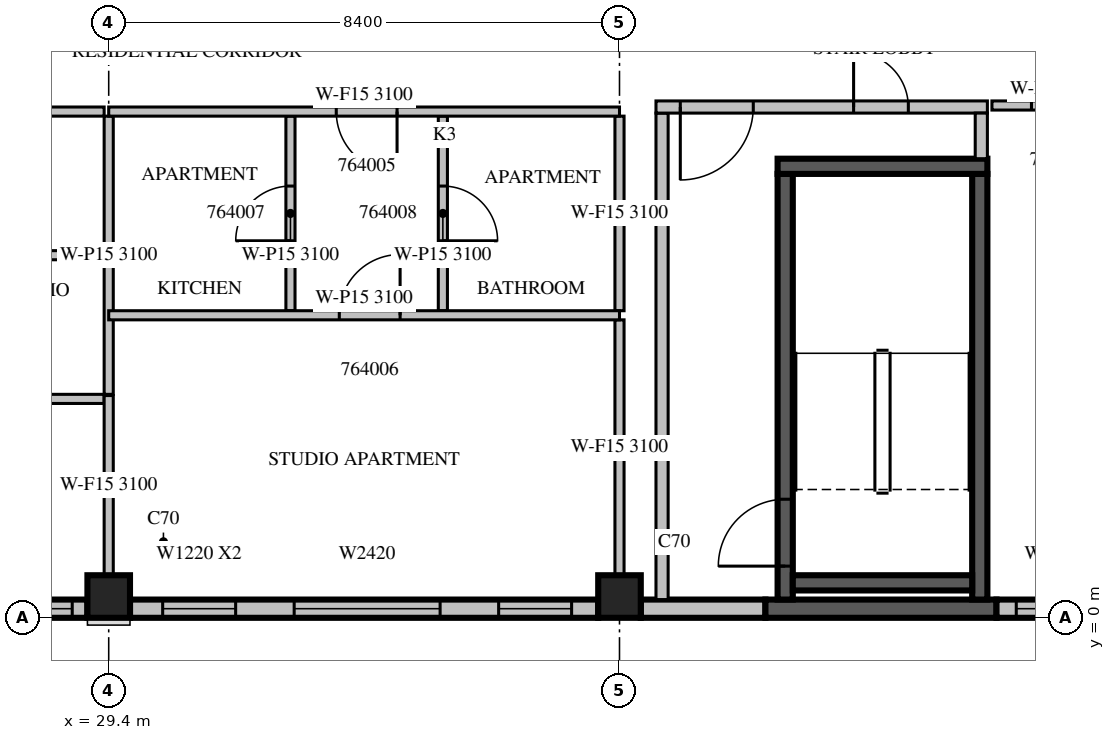
"""IFC4 building model, lengths in metres.
Left out: names, types, materials, properties, quantities, classifications, styles, units other than length and angle.
Written with IfcOpenShell. Run it as: python <this file> out.ifc"""

import sys

from ifc_helpers import new_model, si_unit, direction, frame, frame_2d, origin, origin_2d, place, context, subcontext, project, spatial, rectangle, extrude, source, transform, mapped, element, fill, save


model = new_model("IFC4")
c1 = context("Model", 3, precision=1e-05, world=origin(), true_north=direction((0.0, 1.0)))
c2 = subcontext(c1, "Body", "Model", "MODEL_VIEW")
j1 = project(units=[si_unit("LENGTHUNIT", "METRE"), si_unit("PLANEANGLEUNIT", "RADIAN")], contexts=[c1])
p1 = place(None, origin())
s1 = spatial("IfcSite", under=j1, at=p1, CompositionType="ELEMENT")
p2 = place(p1, origin())
s2 = spatial("IfcBuilding", under=s1, at=p2, CompositionType="ELEMENT")
p3 = place(p2, frame((0.0, 0.0, 284.5)))
s3 = spatial("IfcBuildingStorey", under=s2, at=p3, CompositionType="ELEMENT", Elevation=284.5)
m1 = source(origin(), c2, "Body", "SweptSolid", [
    extrude(rectangle(XDim=0.7, YDim=0.7, at=origin_2d()), origin(), (0.0, 0.0, 1.0), 3.5),
])
for number, where, z_axis, x_axis in (
    (1, (29.4, 0.35, 0.0), (0.0, 0.0, 1.0), (1.0, 0.0, 0.0)),
    (2, (37.8, 0.35, 0.0), (0.0, 0.0, 1.0), (1.0, 0.0, 0.0)),
):
    element("IfcColumn", number, at=place(p3, frame(where, z_axis=z_axis, x_axis=x_axis)), inside=s3, PredefinedType="COLUMN", context=c2, shape_type="MappedRepresentation", body=[
        mapped(m1, transform((0.0, 0.0, 0.0), scale=1.0)),
    ])
p4 = place(p3, frame((21.35, 0.15, 0.0), z_axis=(0.0, 0.0, 1.0), x_axis=(1.0, 0.0, 0.0)))
e3 = element("IfcWall", 3, at=p4, inside=s3, PredefinedType="STANDARD", context=c2, shape_type="SweptSolid", body=[
    extrude(rectangle(XDim=7.7, YDim=0.3, at=frame_2d((3.85, 0.0))), origin(), (0.0, 0.0, 1.0), 3.1),
])
p5 = place(p4, frame((0.25, 0.0, 0.6)))
e4 = element("IfcOpeningElement", 4, at=p5, cuts=e3, PredefinedType="OPENING", context=c2, shape_type="SweptSolid", body=[
    extrude(rectangle(XDim=3.0, YDim=2.0, at=frame_2d((1.5, 1.0))), frame((0.0, 0.16, 0.0), z_axis=(0.0, -1.0, 0.0), x_axis=(1.0, 0.0, 0.0)), (0.0, 0.0, 1.0), 0.32),
])
m2 = source(origin(), c2, "Body", "SweptSolid", [
    extrude(rectangle(XDim=3.0, YDim=2.0, at=frame_2d((1.5, 1.0))), frame((0.0, 0.16, 0.0), z_axis=(0.0, -1.0, 0.0), x_axis=(1.0, 0.0, 0.0)), (0.0, 0.0, 1.0), 0.32),
])
p6 = place(p4, frame((4.45, 0.0, 0.6)))
e5 = element("IfcOpeningElement", 5, at=p6, cuts=e3, PredefinedType="OPENING", context=c2, shape_type="MappedRepresentation", body=[
    mapped(m2, transform((0.0, 0.0, 0.0), scale=1.0)),
])
m3 = source(origin(), c2, "Body", "SweptSolid", [
    extrude(rectangle(XDim=7.7, YDim=0.3, at=frame_2d((3.85, 0.0))), origin(), (0.0, 0.0, 1.0), 3.1),
])
p7 = place(p3, frame((29.75, 0.15, 0.0), z_axis=(0.0, 0.0, 1.0), x_axis=(1.0, 0.0, 0.0)))
e6 = element("IfcWall", 6, at=p7, inside=s3, PredefinedType="STANDARD", context=c2, shape_type="MappedRepresentation", body=[
    mapped(m3, transform((0.0, 0.0, 0.0), scale=1.0)),
])
p8 = place(p7, frame((0.537, 0.0, 0.6)))
e7 = element("IfcOpeningElement", 7, at=p8, cuts=e6, PredefinedType="OPENING", context=c2, shape_type="SweptSolid", body=[
    extrude(rectangle(XDim=1.2, YDim=2.0, at=frame_2d((0.6, 1.0))), frame((0.0, 0.16, 0.0), z_axis=(0.0, -1.0, 0.0), x_axis=(1.0, 0.0, 0.0)), (0.0, 0.0, 1.0), 0.32),
])
m4 = source(origin(), c2, "Body", "SweptSolid", [
    extrude(rectangle(XDim=1.2, YDim=2.0, at=frame_2d((0.6, 1.0))), frame((0.0, 0.16, 0.0), z_axis=(0.0, -1.0, 0.0), x_axis=(1.0, 0.0, 0.0)), (0.0, 0.0, 1.0), 0.32),
])
p9 = place(p7, frame((6.062, 0.0, 0.6)))
e8 = element("IfcOpeningElement", 8, at=p9, cuts=e6, PredefinedType="OPENING", context=c2, shape_type="MappedRepresentation", body=[
    mapped(m4, transform((0.0, 0.0, 0.0), scale=1.0)),
])
p10 = place(p7, frame((2.7, 0.0, 0.6)))
e9 = element("IfcOpeningElement", 9, at=p10, cuts=e6, PredefinedType="OPENING", context=c2, shape_type="SweptSolid", body=[
    extrude(rectangle(XDim=2.4, YDim=2.0, at=frame_2d((1.2, 1.0))), frame((0.0, 0.16, 0.0), z_axis=(0.0, -1.0, 0.0), x_axis=(1.0, 0.0, 0.0)), (0.0, 0.0, 1.0), 0.32),
])
p11 = place(p3, frame((38.15, 0.15, 0.0), z_axis=(0.0, 0.0, 1.0), x_axis=(1.0, 0.0, 0.0)))
e10 = element("IfcWall", 10, at=p11, inside=s3, PredefinedType="STANDARD", context=c2, shape_type="SweptSolid", body=[
    extrude(rectangle(XDim=2.05, YDim=0.3, at=frame_2d((1.025, 0.0))), origin(), (0.0, 0.0, 1.0), 3.1),
])
p12 = place(p3, frame((40.2, 0.15, 0.0), z_axis=(0.0, 0.0, 1.0), x_axis=(1.0, 0.0, 0.0)))
e11 = element("IfcWall", 11, at=p12, inside=s3, PredefinedType="SOLIDWALL", context=c2, shape_type="SweptSolid", body=[
    extrude(rectangle(XDim=3.8, YDim=0.3, at=frame_2d((1.9, 0.0))), origin(), (0.0, 0.0, 1.0), 3.1),
])
p13 = place(p3, frame((44.0, 0.15, 0.0), z_axis=(0.0, 0.0, 1.0), x_axis=(1.0, 0.0, 0.0)))
e12 = element("IfcWall", 12, at=p13, inside=s3, PredefinedType="STANDARD", context=c2, shape_type="SweptSolid", body=[
    extrude(rectangle(XDim=1.85, YDim=0.3, at=frame_2d((0.925, 0.0))), origin(), (0.0, 0.0, 1.0), 3.1),
])
p14 = place(p13, frame((0.325, 0.0, 0.6)))
e13 = element("IfcOpeningElement", 13, at=p14, cuts=e12, PredefinedType="OPENING", context=c2, shape_type="MappedRepresentation", body=[
    mapped(m4, transform((0.0, 0.0, 0.0), scale=1.0)),
])
p15 = place(p3, frame((40.525, 0.3, 0.0), z_axis=(0.0, 0.0, 1.0), x_axis=(0.0, 1.0, 0.0)))
e14 = element("IfcWall", 14, at=p15, inside=s3, PredefinedType="SOLIDWALL", context=c2, shape_type="SweptSolid", body=[
    extrude(rectangle(XDim=7.0, YDim=0.25, at=frame_2d((3.5, 0.0))), origin(), (0.0, 0.0, 1.0), 3.1),
])
m5 = source(origin(), c2, "Body", "SweptSolid", [
    extrude(rectangle(XDim=1.1, YDim=2.1, at=frame_2d((0.55, 1.05))), frame((0.0, 0.135, 0.0), z_axis=(0.0, -1.0, 0.0), x_axis=(1.0, 0.0, 0.0)), (0.0, 0.0, 1.0), 0.27),
])
p16 = place(p15, frame((0.55, 0.0, 0.0)))
e15 = element("IfcOpeningElement", 15, at=p16, cuts=e14, PredefinedType="OPENING", context=c2, shape_type="MappedRepresentation", body=[
    mapped(m5, transform((0.0, 0.0, 0.0), scale=1.0)),
])
m6 = source(origin(), c2, "Body", "SweptSolid", [
    extrude(rectangle(XDim=7.0, YDim=0.25, at=frame_2d((3.5, 0.0))), origin(), (0.0, 0.0, 1.0), 3.1),
])
p17 = place(p3, frame((43.725, 0.3, 0.0), z_axis=(0.0, 0.0, 1.0), x_axis=(0.0, 1.0, 0.0)))
e16 = element("IfcWall", 16, at=p17, inside=s3, PredefinedType="SOLIDWALL", context=c2, shape_type="MappedRepresentation", body=[
    mapped(m6, transform((0.0, 0.0, 0.0), scale=1.0)),
])
p18 = place(p3, frame((40.4, 7.425, 0.0), z_axis=(0.0, 0.0, 1.0), x_axis=(1.0, 0.0, 0.0)))
e17 = element("IfcWall", 17, at=p18, inside=s3, PredefinedType="SOLIDWALL", context=c2, shape_type="SweptSolid", body=[
    extrude(rectangle(XDim=3.45, YDim=0.25, at=frame_2d((1.725, 0.0))), origin(), (0.0, 0.0, 1.0), 3.1),
])
p19 = place(p3, frame((40.65, 0.575, 0.0), z_axis=(0.0, 0.0, 1.0), x_axis=(1.0, 0.0, 0.0)))
e18 = element("IfcWall", 18, at=p19, inside=s3, PredefinedType="SOLIDWALL", context=c2, shape_type="SweptSolid", body=[
    extrude(rectangle(XDim=2.95, YDim=0.25, at=frame_2d((1.475, 0.0))), origin(), (0.0, 0.0, 1.0), 3.1),
])
p20 = place(p3, frame((38.5, 0.3, 0.0), z_axis=(0.0, 0.0, 1.0), x_axis=(0.0, 1.0, 0.0)))
e19 = element("IfcWall", 19, at=p20, inside=s3, PredefinedType="PARTITIONING", context=c2, shape_type="SweptSolid", body=[
    extrude(rectangle(XDim=8.0, YDim=0.2, at=frame_2d((4.0, 0.0))), origin(), (0.0, 0.0, 1.0), 3.1),
])
p21 = place(p3, frame((38.4, 8.4, 0.0), z_axis=(0.0, 0.0, 1.0), x_axis=(1.0, 0.0, 0.0)))
e20 = element("IfcWall", 20, at=p21, inside=s3, PredefinedType="PARTITIONING", context=c2, shape_type="SweptSolid", body=[
    extrude(rectangle(XDim=5.45, YDim=0.2, at=frame_2d((2.725, 0.0))), origin(), (0.0, 0.0, 1.0), 3.1),
])
m7 = source(origin(), c2, "Body", "SweptSolid", [
    extrude(rectangle(XDim=1.2, YDim=2.1, at=frame_2d((0.6, 1.05))), frame((0.0, 0.11, 0.0), z_axis=(0.0, -1.0, 0.0), x_axis=(1.0, 0.0, 0.0)), (0.0, 0.0, 1.0), 0.22),
])
p22 = place(p21, frame((0.4, 0.0, 0.0)))
e21 = element("IfcOpeningElement", 21, at=p22, cuts=e20, PredefinedType="OPENING", context=c2, shape_type="MappedRepresentation", body=[
    mapped(m7, transform((0.0, 0.0, 0.0), scale=1.0)),
])
m8 = source(origin(), c2, "Body", "SweptSolid", [
    extrude(rectangle(XDim=0.9, YDim=2.1, at=frame_2d((0.45, 1.05))), frame((0.0, 0.11, 0.0), z_axis=(0.0, -1.0, 0.0), x_axis=(1.0, 0.0, 0.0)), (0.0, 0.0, 1.0), 0.22),
])
p23 = place(p21, frame((3.25, 0.0, 0.0)))
e22 = element("IfcOpeningElement", 22, at=p23, cuts=e20, PredefinedType="OPENING", context=c2, shape_type="MappedRepresentation", body=[
    mapped(m8, transform((0.0, 0.0, 0.0), scale=1.0)),
])
p24 = place(p3, frame((43.75, 7.55, 0.0), z_axis=(0.0, 0.0, 1.0), x_axis=(0.0, 1.0, 0.0)))
e23 = element("IfcWall", 23, at=p24, inside=s3, PredefinedType="PARTITIONING", context=c2, shape_type="SweptSolid", body=[
    extrude(rectangle(XDim=0.75, YDim=0.2, at=frame_2d((0.375, 0.0))), origin(), (0.0, 0.0, 1.0), 3.1),
])
m9 = source(origin(), c2, "Body", "SweptSolid", [
    extrude(rectangle(XDim=4.575, YDim=0.15, at=frame_2d((2.288, 0.0))), origin(), (0.0, 0.0, 1.0), 3.1),
])
p25 = place(p3, frame((29.4, 3.675, 0.0), z_axis=(0.0, 0.0, 1.0), x_axis=(0.0, 1.0, 0.0)))
e24 = element("IfcWall", 24, at=p25, inside=s3, PredefinedType="PARTITIONING", context=c2, shape_type="MappedRepresentation", body=[
    mapped(m9, transform((0.0, 0.0, 0.0), scale=1.0)),
])
p26 = place(p3, frame((29.325, 8.325, 0.0), z_axis=(0.0, 0.0, 1.0), x_axis=(-1.0, 0.0, 0.0)))
e25 = element("IfcWall", 25, at=p26, inside=s3, PredefinedType="PARTITIONING", context=c2, shape_type="SweptSolid", body=[
    extrude(rectangle(XDim=5.75, YDim=0.15, at=frame_2d((2.875, 0.0))), origin(), (0.0, 0.0, 1.0), 3.1),
])
m10 = source(origin(), c2, "Body", "SweptSolid", [
    extrude(rectangle(XDim=1.0, YDim=2.1, at=frame_2d((0.5, 1.05))), frame((0.0, 0.085, 0.0), z_axis=(0.0, -1.0, 0.0), x_axis=(1.0, 0.0, 0.0)), (0.0, 0.0, 1.0), 0.17),
])
p27 = place(p26, frame((2.375, 0.0, 0.0)))
e26 = element("IfcOpeningElement", 26, at=p27, cuts=e25, PredefinedType="OPENING", context=c2, shape_type="MappedRepresentation", body=[
    mapped(m10, transform((0.0, 0.0, 0.0), scale=1.0)),
])
m11 = source(origin(), c2, "Body", "SweptSolid", [
    extrude(rectangle(XDim=5.75, YDim=0.15, at=frame_2d((2.875, 0.0))), origin(), (0.0, 0.0, 1.0), 3.1),
])
p28 = place(p3, frame((29.325, 5.963, 0.0), z_axis=(0.0, 0.0, 1.0), x_axis=(-1.0, 0.0, 0.0)))
e27 = element("IfcWall", 27, at=p28, inside=s3, PredefinedType="PARTITIONING", context=c2, shape_type="MappedRepresentation", body=[
    mapped(m11, transform((0.0, 0.0, 0.0), scale=1.0)),
])
p29 = place(p3, frame((21.6, 3.6, 0.0), z_axis=(0.0, 0.0, 1.0), x_axis=(1.0, 0.0, 0.0)))
e28 = element("IfcWall", 28, at=p29, inside=s3, PredefinedType="PARTITIONING", context=c2, shape_type="SweptSolid", body=[
    extrude(rectangle(XDim=7.725, YDim=0.15, at=frame_2d((3.862, 0.0))), origin(), (0.0, 0.0, 1.0), 3.1),
])
p30 = place(p29, frame((0.45, 0.0, 0.0)))
e29 = element("IfcOpeningElement", 29, at=p30, cuts=e28, PredefinedType="OPENING", context=c2, shape_type="MappedRepresentation", body=[
    mapped(m10, transform((0.0, 0.0, 0.0), scale=1.0)),
])
m12 = source(origin(), c2, "Body", "SweptSolid", [
    extrude(rectangle(XDim=0.9, YDim=2.1, at=frame_2d((0.45, 1.05))), frame((0.0, 0.085, 0.0), z_axis=(0.0, -1.0, 0.0), x_axis=(1.0, 0.0, 0.0)), (0.0, 0.0, 1.0), 0.17),
])
p31 = place(p29, frame((3.413, 0.0, 0.0)))
e30 = element("IfcOpeningElement", 30, at=p31, cuts=e28, PredefinedType="OPENING", context=c2, shape_type="MappedRepresentation", body=[
    mapped(m12, transform((0.0, 0.0, 0.0), scale=1.0)),
])
p32 = place(p3, frame((46.125, 8.425, 0.0), z_axis=(0.0, 0.0, 1.0), x_axis=(-1.0, 0.0, 0.0)))
e31 = element("IfcWall", 31, at=p32, inside=s3, PredefinedType="PARTITIONING", context=c2, shape_type="SweptSolid", body=[
    extrude(rectangle(XDim=2.2, YDim=0.15, at=frame_2d((1.1, 0.0))), origin(), (0.0, 0.0, 1.0), 3.1),
])
p33 = place(p32, frame((0.65, 0.0, 0.0)))
e32 = element("IfcOpeningElement", 32, at=p33, cuts=e31, PredefinedType="OPENING", context=c2, shape_type="MappedRepresentation", body=[
    mapped(m12, transform((0.0, 0.0, 0.0), scale=1.0)),
])
p34 = place(p3, frame((32.389, 5.05, 0.0), z_axis=(0.0, 0.0, 1.0), x_axis=(0.0, 1.0, 0.0)))
e33 = element("IfcWall", 33, at=p34, inside=s3, PredefinedType="PARTITIONING", context=c2, shape_type="SweptSolid", body=[
    extrude(rectangle(XDim=3.2, YDim=0.15, at=frame_2d((1.6, 0.0))), origin(), (0.0, 0.0, 1.0), 3.1),
])
p35 = place(p34, frame((1.15, 0.0, 0.0)))
e34 = element("IfcOpeningElement", 34, at=p35, cuts=e33, PredefinedType="OPENING", context=c2, shape_type="MappedRepresentation", body=[
    mapped(m12, transform((0.0, 0.0, 0.0), scale=1.0)),
])
m13 = source(origin(), c2, "Body", "SweptSolid", [
    extrude(rectangle(XDim=3.2, YDim=0.15, at=frame_2d((1.6, 0.0))), origin(), (0.0, 0.0, 1.0), 3.1),
])
p36 = place(p3, frame((34.895, 5.05, 0.0), z_axis=(0.0, 0.0, 1.0), x_axis=(0.0, 1.0, 0.0)))
e35 = element("IfcWall", 35, at=p36, inside=s3, PredefinedType="PARTITIONING", context=c2, shape_type="MappedRepresentation", body=[
    mapped(m13, transform((0.0, 0.0, 0.0), scale=1.0)),
])
p37 = place(p36, frame((1.15, 0.0, 0.0)))
e36 = element("IfcOpeningElement", 36, at=p37, cuts=e35, PredefinedType="OPENING", context=c2, shape_type="MappedRepresentation", body=[
    mapped(m12, transform((0.0, 0.0, 0.0), scale=1.0)),
])
p38 = place(p3, frame((29.4, 0.699, 0.0), z_axis=(0.0, 0.0, 1.0), x_axis=(0.0, 1.0, 0.0)))
e37 = element("IfcWall", 37, at=p38, inside=s3, PredefinedType="PARTITIONING", context=c2, shape_type="SweptSolid", body=[
    extrude(rectangle(XDim=2.956, YDim=0.15, at=frame_2d((1.478, 0.0))), origin(), (0.0, 0.0, 1.0), 3.1),
])
p39 = place(p3, frame((37.8, 0.699, 0.0), z_axis=(0.0, 0.0, 1.0), x_axis=(0.0, 1.0, 0.0)))
e38 = element("IfcWall", 38, at=p39, inside=s3, PredefinedType="PARTITIONING", context=c2, shape_type="SweptSolid", body=[
    extrude(rectangle(XDim=4.201, YDim=0.15, at=frame_2d((2.1, 0.0))), origin(), (0.0, 0.0, 1.0), 3.1),
])
p40 = place(p3, frame((37.8, 5.05, 0.0), z_axis=(0.0, 0.0, 1.0), x_axis=(0.0, 1.0, 0.0)))
e39 = element("IfcWall", 39, at=p40, inside=s3, PredefinedType="PARTITIONING", context=c2, shape_type="MappedRepresentation", body=[
    mapped(m13, transform((0.0, 0.0, 0.0), scale=1.0)),
])
p41 = place(p3, frame((37.8, 4.975, 0.0), z_axis=(0.0, 0.0, 1.0), x_axis=(-1.0, 0.0, 0.0)))
e40 = element("IfcWall", 40, at=p41, inside=s3, PredefinedType="PARTITIONING", context=c2, shape_type="SweptSolid", body=[
    extrude(rectangle(XDim=8.4, YDim=0.15, at=frame_2d((4.2, 0.0))), origin(), (0.0, 0.0, 1.0), 3.1),
])
p42 = place(p41, frame((3.608, 0.0, 0.0)))
e41 = element("IfcOpeningElement", 41, at=p42, cuts=e40, PredefinedType="OPENING", context=c2, shape_type="MappedRepresentation", body=[
    mapped(m10, transform((0.0, 0.0, 0.0), scale=1.0)),
])
m14 = source(origin(), c2, "Body", "SweptSolid", [
    extrude(rectangle(XDim=8.4, YDim=0.15, at=frame_2d((4.2, 0.0))), origin(), (0.0, 0.0, 1.0), 3.1),
])
p43 = place(p3, frame((37.8, 8.325, 0.0), z_axis=(0.0, 0.0, 1.0), x_axis=(-1.0, 0.0, 0.0)))
e42 = element("IfcWall", 42, at=p43, inside=s3, PredefinedType="PARTITIONING", context=c2, shape_type="MappedRepresentation", body=[
    mapped(m14, transform((0.0, 0.0, 0.0), scale=1.0)),
])
p44 = place(p43, frame((3.658, 0.0, 0.0)))
e43 = element("IfcOpeningElement", 43, at=p44, cuts=e42, PredefinedType="OPENING", context=c2, shape_type="MappedRepresentation", body=[
    mapped(m10, transform((0.0, 0.0, 0.0), scale=1.0)),
])
m15 = source(origin(), c2, "Body", "SweptSolid", [
    extrude(rectangle(XDim=3.0, YDim=2.0, at=frame_2d((1.5, 1.0))), frame((0.0, 0.03, 0.0), z_axis=(0.0, -1.0, 0.0), x_axis=(1.0, 0.0, 0.0)), (0.0, 0.0, 1.0), 0.06),
])
p45 = place(p6, origin())
e44 = element("IfcWindow", 44, at=p45, inside=s3, PartitioningType="SINGLE_PANEL", PredefinedType="WINDOW", context=c2, shape_type="MappedRepresentation", body=[
    mapped(m15, transform((0.0, 0.0, 0.0), scale=1.0)),
])
fill(e5, e44)
p46 = place(p8, origin())
e45 = element("IfcWindow", 45, at=p46, inside=s3, PartitioningType="SINGLE_PANEL", PredefinedType="WINDOW", context=c2, shape_type="SweptSolid", body=[
    extrude(rectangle(XDim=1.2, YDim=2.0, at=frame_2d((0.6, 1.0))), frame((0.0, 0.03, 0.0), z_axis=(0.0, -1.0, 0.0), x_axis=(1.0, 0.0, 0.0)), (0.0, 0.0, 1.0), 0.06),
])
fill(e7, e45)
m16 = source(origin(), c2, "Body", "SweptSolid", [
    extrude(rectangle(XDim=1.2, YDim=2.0, at=frame_2d((0.6, 1.0))), frame((0.0, 0.03, 0.0), z_axis=(0.0, -1.0, 0.0), x_axis=(1.0, 0.0, 0.0)), (0.0, 0.0, 1.0), 0.06),
])
p47 = place(p9, origin())
e46 = element("IfcWindow", 46, at=p47, inside=s3, PartitioningType="SINGLE_PANEL", PredefinedType="WINDOW", context=c2, shape_type="MappedRepresentation", body=[
    mapped(m16, transform((0.0, 0.0, 0.0), scale=1.0)),
])
fill(e8, e46)
p48 = place(p10, origin())
e47 = element("IfcWindow", 47, at=p48, inside=s3, PartitioningType="SINGLE_PANEL", PredefinedType="WINDOW", context=c2, shape_type="SweptSolid", body=[
    extrude(rectangle(XDim=2.4, YDim=2.0, at=frame_2d((1.2, 1.0))), frame((0.0, 0.03, 0.0), z_axis=(0.0, -1.0, 0.0), x_axis=(1.0, 0.0, 0.0)), (0.0, 0.0, 1.0), 0.06),
])
fill(e9, e47)
p49 = place(p14, origin())
e48 = element("IfcWindow", 48, at=p49, inside=s3, PartitioningType="SINGLE_PANEL", PredefinedType="WINDOW", context=c2, shape_type="MappedRepresentation", body=[
    mapped(m16, transform((0.0, 0.0, 0.0), scale=1.0)),
])
fill(e13, e48)
m17 = source(origin(), c2, "Body", "SweptSolid", [
    extrude(rectangle(XDim=1.1, YDim=2.1, at=frame_2d((0.55, 1.05))), frame((0.0, 0.025, 0.0), z_axis=(0.0, -1.0, 0.0), x_axis=(1.0, 0.0, 0.0)), (0.0, 0.0, 1.0), 0.05),
])
p50 = place(p16, origin())
e49 = element("IfcDoor", 49, at=p50, inside=s3, OperationType="SINGLE_SWING_LEFT", PredefinedType="DOOR", context=c2, shape_type="MappedRepresentation", body=[
    mapped(m17, transform((0.0, 0.0, 0.0), scale=1.0)),
])
fill(e15, e49)
m18 = source(origin(), c2, "Body", "SweptSolid", [
    extrude(rectangle(XDim=1.2, YDim=2.1, at=frame_2d((0.6, 1.05))), frame((0.0, 0.025, 0.0), z_axis=(0.0, -1.0, 0.0), x_axis=(1.0, 0.0, 0.0)), (0.0, 0.0, 1.0), 0.05),
])
p51 = place(p22, origin())
e50 = element("IfcDoor", 50, at=p51, inside=s3, OperationType="SINGLE_SWING_RIGHT", PredefinedType="DOOR", context=c2, shape_type="MappedRepresentation", body=[
    mapped(m18, transform((0.0, 0.0, 0.0), scale=1.0)),
])
fill(e21, e50)
m19 = source(origin(), c2, "Body", "SweptSolid", [
    extrude(rectangle(XDim=0.9, YDim=2.1, at=frame_2d((0.45, 1.05))), frame((0.0, 0.025, 0.0), z_axis=(0.0, -1.0, 0.0), x_axis=(1.0, 0.0, 0.0)), (0.0, 0.0, 1.0), 0.05),
])
p52 = place(p23, origin())
e51 = element("IfcDoor", 51, at=p52, inside=s3, OperationType="SINGLE_SWING_LEFT", PredefinedType="DOOR", context=c2, shape_type="MappedRepresentation", body=[
    mapped(m19, transform((0.0, 0.0, 0.0), scale=1.0)),
])
fill(e22, e51)
p53 = place(p33, origin())
e52 = element("IfcDoor", 52, at=p53, inside=s3, OperationType="SINGLE_SWING_RIGHT", PredefinedType="DOOR", context=c2, shape_type="MappedRepresentation", body=[
    mapped(m19, transform((0.0, 0.0, 0.0), scale=1.0)),
])
fill(e32, e52)
m20 = source(origin(), c2, "Body", "SweptSolid", [
    extrude(rectangle(XDim=1.0, YDim=2.1, at=frame_2d((0.5, 1.05))), frame((0.0, 0.025, 0.0), z_axis=(0.0, -1.0, 0.0), x_axis=(1.0, 0.0, 0.0)), (0.0, 0.0, 1.0), 0.05),
])
p54 = place(p44, origin())
e53 = element("IfcDoor", 53, at=p54, inside=s3, OperationType="SINGLE_SWING_LEFT", PredefinedType="DOOR", context=c2, shape_type="MappedRepresentation", body=[
    mapped(m20, transform((0.0, 0.0, 0.0), scale=1.0)),
])
fill(e43, e53)
p55 = place(p42, origin())
e54 = element("IfcDoor", 54, at=p55, inside=s3, OperationType="SINGLE_SWING_RIGHT", PredefinedType="DOOR", context=c2, shape_type="MappedRepresentation", body=[
    mapped(m20, transform((0.0, 0.0, 0.0), scale=1.0)),
])
fill(e41, e54)
p56 = place(p35, origin())
e55 = element("IfcDoor", 55, at=p56, inside=s3, OperationType="SINGLE_SWING_LEFT", PredefinedType="DOOR", context=c2, shape_type="MappedRepresentation", body=[
    mapped(m19, transform((0.0, 0.0, 0.0), scale=1.0)),
])
fill(e34, e55)
p57 = place(p37, origin())
e56 = element("IfcDoor", 56, at=p57, inside=s3, OperationType="SINGLE_SWING_RIGHT", PredefinedType="DOOR", context=c2, shape_type="MappedRepresentation", body=[
    mapped(m19, transform((0.0, 0.0, 0.0), scale=1.0)),
])
fill(e36, e56)
save(model, sys.argv[1])
